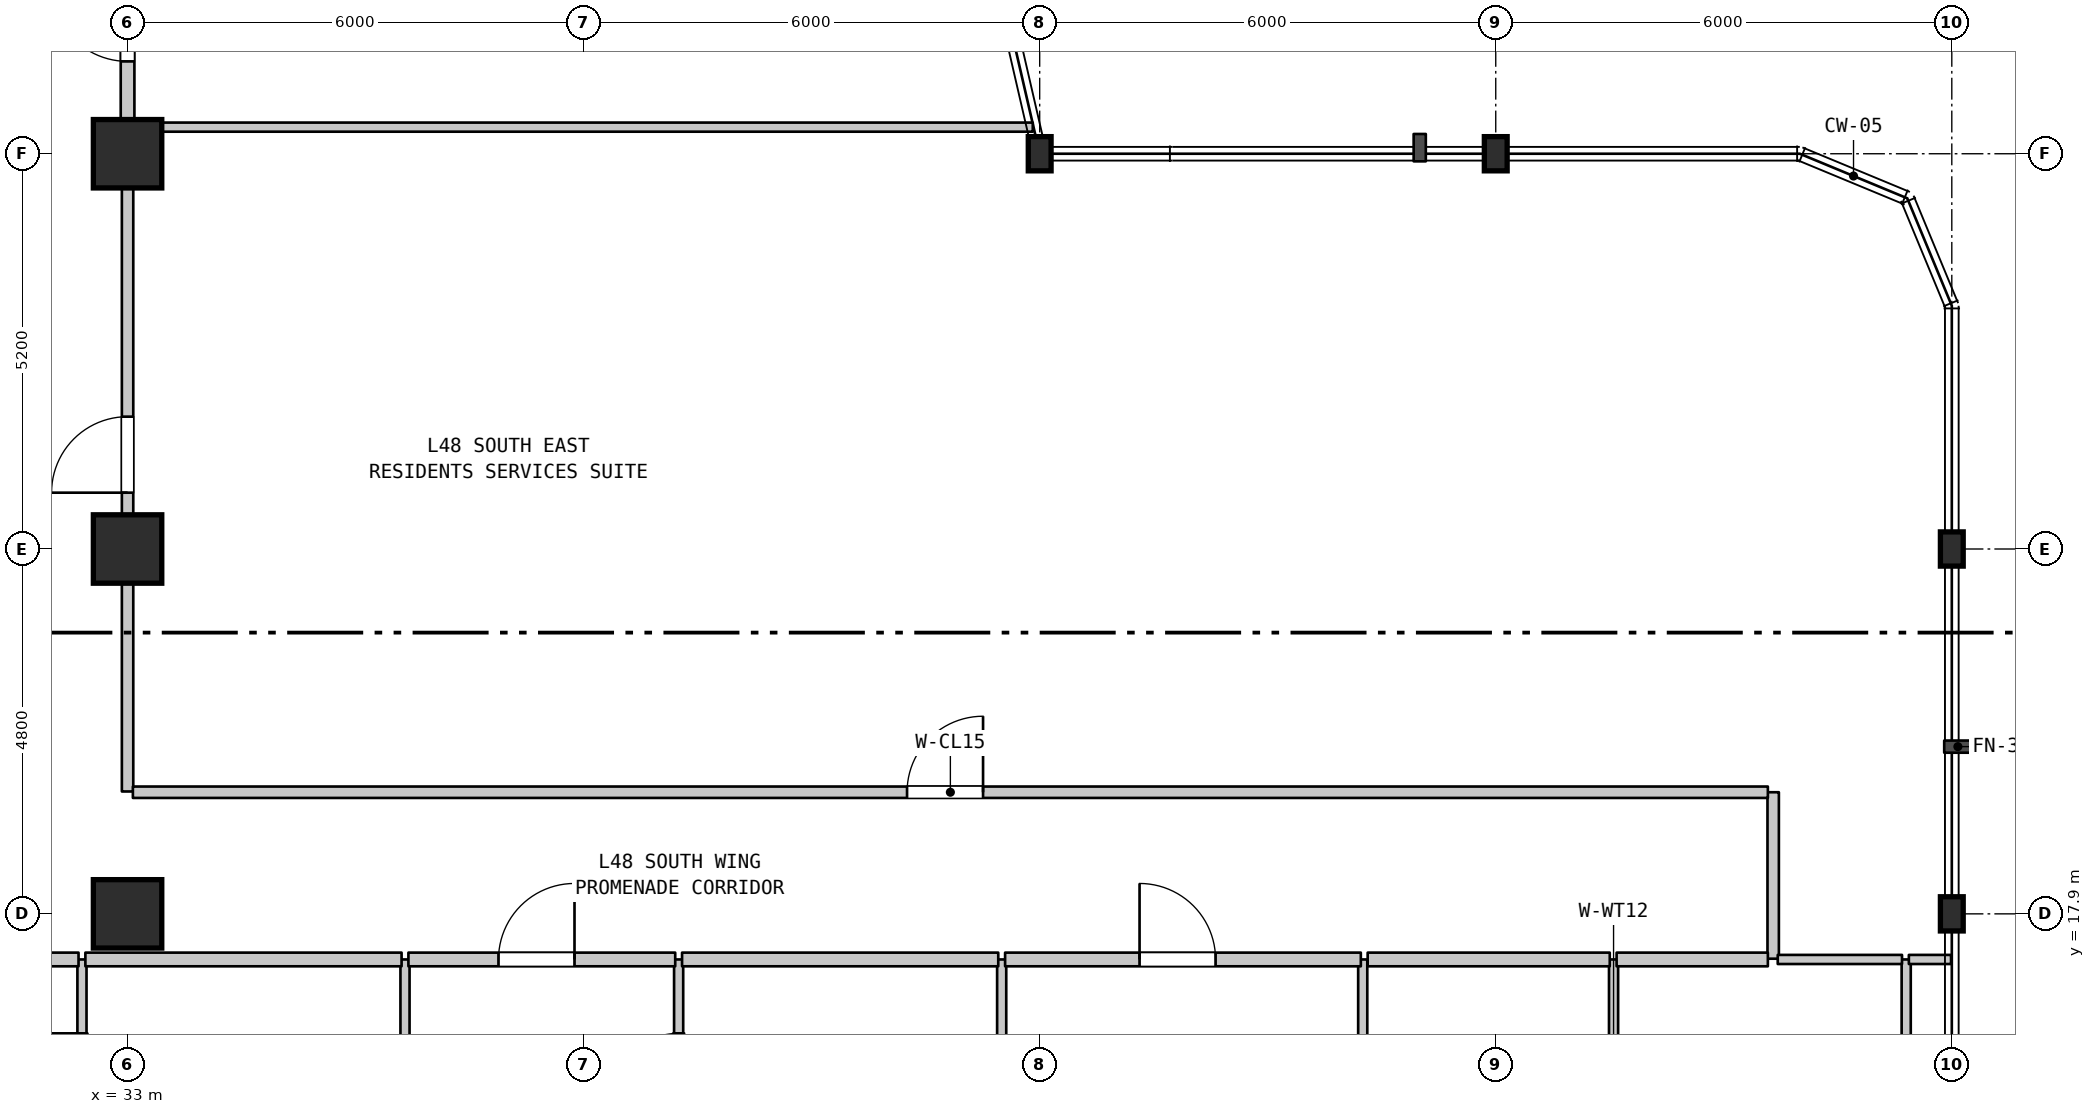
"""IFC4 building model, lengths in metres.
Left out: names, types, materials, properties, quantities, classifications, styles, units other than length and angle.
Written with IfcOpenShell. Run it as: python <this file> out.ifc"""

import sys

from ifc_helpers import new_model, si_unit, direction, frame, frame_2d, origin, origin_2d, place, context, subcontext, project, spatial, rectangle, i_section, extrude, element, fill, save


model = new_model("IFC4")
c1 = context("Model", 3, precision=1e-05, world=origin(), true_north=direction((0.0, 1.0)))
c2 = subcontext(c1, "Body", "Model", "MODEL_VIEW")
j1 = project(units=[si_unit("LENGTHUNIT", "METRE"), si_unit("PLANEANGLEUNIT", "RADIAN")], contexts=[c1])
p1 = place(None, origin())
s1 = spatial("IfcSite", under=j1, at=p1, CompositionType="ELEMENT")
p2 = place(p1, origin())
s2 = spatial("IfcBuilding", under=s1, at=p2, CompositionType="ELEMENT")
p3 = place(p2, frame((0.0, 0.0, 195.8)))
s3 = spatial("IfcBuildingStorey", under=s2, at=p3, CompositionType="ELEMENT", Elevation=195.8)
for number, where, z_axis, x_axis in (
    (1, (33.0, 17.9, 0.0), (0.0, 0.0, 1.0), (1.0, 0.0, 0.0)),
    (2, (33.0, 22.7, 0.0), (0.0, 0.0, 1.0), (1.0, 0.0, 0.0)),
    (3, (33.0, 27.9, 0.0), (0.0, 0.0, 1.0), (1.0, 0.0, 0.0)),
):
    element("IfcColumn", number, at=place(p3, frame(where, z_axis=z_axis, x_axis=x_axis)), inside=s3, PredefinedType="COLUMN", context=c2, shape_type="SweptSolid", body=[
        extrude(rectangle(XDim=0.9, YDim=0.9, at=origin_2d()), origin(), (0.0, 0.0, 1.0), 3.7),
    ])
for number, where, z_axis, x_axis in (
    (4, (45.0, 27.9, 0.0), (0.0, 0.0, 1.0), (1.0, 0.0, 0.0)),
    (5, (51.0, 27.9, 0.0), (0.0, 0.0, 1.0), (1.0, 0.0, 0.0)),
    (6, (57.0, 17.9, 0.0), (0.0, 0.0, 1.0), (1.0, 0.0, 0.0)),
    (7, (57.0, 22.7, 0.0), (0.0, 0.0, 1.0), (1.0, 0.0, 0.0)),
):
    element("IfcColumn", number, at=place(p3, frame(where, z_axis=z_axis, x_axis=x_axis)), inside=s3, PredefinedType="COLUMN", context=c2, shape_type="SweptSolid", body=[
        extrude(i_section(OverallWidth=0.3, OverallDepth=0.45, WebThickness=0.014, FlangeThickness=0.026, FilletRadius=0.027, at=origin_2d()), origin(), (0.0, 0.0, 1.0), 3.7),
    ])
p4 = place(p3, frame((32.4, 14.6, 0.0), z_axis=(0.0, 0.0, 1.0), x_axis=(0.0, 1.0, 0.0)))
e8 = element("IfcWall", 8, at=p4, inside=s3, PredefinedType="PARTITIONING", context=c2, shape_type="SweptSolid", body=[
    extrude(rectangle(XDim=2.7, YDim=0.12, at=frame_2d((1.35, 0.0))), origin(), (0.0, 0.0, 1.0), 3.39),
])
p5 = place(p4, frame((0.828, 0.0, 0.0)))
e9 = element("IfcOpeningElement", 9, at=p5, cuts=e8, PredefinedType="OPENING", context=c2, shape_type="SweptSolid", body=[
    extrude(rectangle(XDim=0.9, YDim=2.1, at=frame_2d((0.45, 1.05))), frame((0.0, 0.07, 0.0), z_axis=(0.0, -1.0, 0.0), x_axis=(1.0, 0.0, 0.0)), (0.0, 0.0, 1.0), 0.14),
])
p6 = place(p3, frame((33.0, 19.51, 0.0), z_axis=(0.0, 0.0, 1.0), x_axis=(0.0, 1.0, 0.0)))
e10 = element("IfcWall", 10, at=p6, inside=s3, PredefinedType="STANDARD", context=c2, shape_type="SweptSolid", body=[
    extrude(rectangle(XDim=8.72, YDim=0.15, at=frame_2d((4.36, 0.0))), origin(), (0.0, 0.0, 1.0), 2.99),
])
p7 = place(p6, frame((3.931, 0.0, 0.0)))
e11 = element("IfcOpeningElement", 11, at=p7, cuts=e10, PredefinedType="OPENING", context=c2, shape_type="SweptSolid", body=[
    extrude(rectangle(XDim=1.0, YDim=2.15, at=frame_2d((0.5, 1.075))), frame((0.0, 0.085, 0.0), z_axis=(0.0, -1.0, 0.0), x_axis=(1.0, 0.0, 0.0)), (0.0, 0.0, 1.0), 0.17),
])
p8 = place(p3, frame((33.0, 28.24, 0.0), z_axis=(0.0, 0.0, 1.0), x_axis=(0.0, 1.0, 0.0)))
e12 = element("IfcWall", 12, at=p8, inside=s3, PredefinedType="STANDARD", context=c2, shape_type="SweptSolid", body=[
    extrude(rectangle(XDim=2.75, YDim=0.18, at=frame_2d((1.375, 0.0))), origin(), (0.0, 0.0, 1.0), 2.89),
])
p9 = place(p8, frame((0.875, 0.0, 0.0)))
e13 = element("IfcOpeningElement", 13, at=p9, cuts=e12, PredefinedType="OPENING", context=c2, shape_type="SweptSolid", body=[
    extrude(rectangle(XDim=1.0, YDim=2.15, at=frame_2d((0.5, 1.075))), frame((0.0, 0.1, 0.0), z_axis=(0.0, -1.0, 0.0), x_axis=(1.0, 0.0, 0.0)), (0.0, 0.0, 1.0), 0.2),
])
p10 = place(p3, frame((36.65, 14.6, 0.0), z_axis=(0.0, 0.0, 1.0), x_axis=(0.0, 1.0, 0.0)))
e14 = element("IfcWall", 14, at=p10, inside=s3, PredefinedType="PARTITIONING", context=c2, shape_type="SweptSolid", body=[
    extrude(rectangle(XDim=2.7, YDim=0.12, at=frame_2d((1.35, 0.0))), origin(), (0.0, 0.0, 1.0), 3.39),
])
p11 = place(p3, frame((40.25, 14.6, 0.0), z_axis=(0.0, 0.0, 1.0), x_axis=(0.0, 1.0, 0.0)))
e15 = element("IfcWall", 15, at=p11, inside=s3, PredefinedType="PARTITIONING", context=c2, shape_type="SweptSolid", body=[
    extrude(rectangle(XDim=2.7, YDim=0.12, at=frame_2d((1.35, 0.0))), origin(), (0.0, 0.0, 1.0), 3.39),
])
p12 = place(p11, frame((0.828, 0.0, 0.0)))
e16 = element("IfcOpeningElement", 16, at=p12, cuts=e15, PredefinedType="OPENING", context=c2, shape_type="SweptSolid", body=[
    extrude(rectangle(XDim=0.9, YDim=2.1, at=frame_2d((0.45, 1.05))), frame((0.0, 0.07, 0.0), z_axis=(0.0, -1.0, 0.0), x_axis=(1.0, 0.0, 0.0)), (0.0, 0.0, 1.0), 0.14),
])
p13 = place(p3, frame((44.5, 14.85, 0.0), z_axis=(0.0, 0.0, 1.0), x_axis=(0.0, 1.0, 0.0)))
e17 = element("IfcWall", 17, at=p13, inside=s3, PredefinedType="PARTITIONING", context=c2, shape_type="SweptSolid", body=[
    extrude(rectangle(XDim=2.45, YDim=0.12, at=frame_2d((1.225, 0.0))), origin(), (0.0, 0.0, 1.0), 3.39),
])
for number, where, z_axis, x_axis in (
    (18, (49.25, 11.15, 0.0), (0.0, 0.0, 1.0), (0.0, 1.0, 0.0)),
    (19, (52.55, 11.15, 0.0), (0.0, 0.0, 1.0), (0.0, 1.0, 0.0)),
):
    element("IfcWall", number, at=place(p3, frame(where, z_axis=z_axis, x_axis=x_axis)), inside=s3, PredefinedType="PARTITIONING", context=c2, shape_type="SweptSolid", body=[
        extrude(rectangle(XDim=6.15, YDim=0.12, at=frame_2d((3.075, 0.0))), origin(), (0.0, 0.0, 1.0), 3.39),
    ])
p14 = place(p3, frame((54.65, 17.31, 0.0), z_axis=(0.0, 0.0, 1.0), x_axis=(0.0, 1.0, 0.0)))
e20 = element("IfcWall", 20, at=p14, inside=s3, PredefinedType="STANDARD", context=c2, shape_type="SweptSolid", body=[
    extrude(rectangle(XDim=2.19, YDim=0.15, at=frame_2d((1.095, 0.0))), origin(), (0.0, 0.0, 1.0), 3.39),
])
p15 = place(p3, frame((56.4, 11.15, 0.0), z_axis=(0.0, 0.0, 1.0), x_axis=(0.0, 1.0, 0.0)))
e21 = element("IfcWall", 21, at=p15, inside=s3, PredefinedType="PARTITIONING", context=c2, shape_type="SweptSolid", body=[
    extrude(rectangle(XDim=6.15, YDim=0.12, at=frame_2d((3.075, 0.0))), origin(), (0.0, 0.0, 1.0), 3.39),
])
p16 = place(p3, frame((28.845, 17.3, 0.0), z_axis=(0.0, 0.0, 1.0), x_axis=(1.0, 0.0, 0.0)))
e22 = element("IfcWall", 22, at=p16, inside=s3, PredefinedType="STANDARD", context=c2, shape_type="SweptSolid", body=[
    extrude(rectangle(XDim=3.51, YDim=0.18, at=frame_2d((1.755, 0.0))), origin(), (0.0, 0.0, 1.0), 3.39),
])
p17 = place(p16, frame((1.255, 0.0, 0.0)))
e23 = element("IfcOpeningElement", 23, at=p17, cuts=e22, PredefinedType="OPENING", context=c2, shape_type="SweptSolid", body=[
    extrude(rectangle(XDim=1.0, YDim=2.15, at=frame_2d((0.5, 1.075))), frame((0.0, 0.1, 0.0), z_axis=(0.0, -1.0, 0.0), x_axis=(1.0, 0.0, 0.0)), (0.0, 0.0, 1.0), 0.2),
])
p18 = place(p3, frame((32.445, 17.3, 0.0), z_axis=(0.0, 0.0, 1.0), x_axis=(1.0, 0.0, 0.0)))
e24 = element("IfcWall", 24, at=p18, inside=s3, PredefinedType="STANDARD", context=c2, shape_type="SweptSolid", body=[
    extrude(rectangle(XDim=4.16, YDim=0.18, at=frame_2d((2.08, 0.0))), origin(), (0.0, 0.0, 1.0), 3.39),
])
p19 = place(p3, frame((36.695, 17.3, 0.0), z_axis=(0.0, 0.0, 1.0), x_axis=(1.0, 0.0, 0.0)))
e25 = element("IfcWall", 25, at=p19, inside=s3, PredefinedType="STANDARD", context=c2, shape_type="SweptSolid", body=[
    extrude(rectangle(XDim=3.51, YDim=0.18, at=frame_2d((1.755, 0.0))), origin(), (0.0, 0.0, 1.0), 3.39),
])
p20 = place(p19, frame((1.185, 0.0, 0.0)))
e26 = element("IfcOpeningElement", 26, at=p20, cuts=e25, PredefinedType="OPENING", context=c2, shape_type="SweptSolid", body=[
    extrude(rectangle(XDim=1.0, YDim=2.15, at=frame_2d((0.5, 1.075))), frame((0.0, 0.1, 0.0), z_axis=(0.0, -1.0, 0.0), x_axis=(1.0, 0.0, 0.0)), (0.0, 0.0, 1.0), 0.2),
])
p21 = place(p3, frame((40.295, 17.3, 0.0), z_axis=(0.0, 0.0, 1.0), x_axis=(1.0, 0.0, 0.0)))
e27 = element("IfcWall", 27, at=p21, inside=s3, PredefinedType="STANDARD", context=c2, shape_type="SweptSolid", body=[
    extrude(rectangle(XDim=4.16, YDim=0.18, at=frame_2d((2.08, 0.0))), origin(), (0.0, 0.0, 1.0), 3.39),
])
p22 = place(p3, frame((44.545, 17.3, 0.0), z_axis=(0.0, 0.0, 1.0), x_axis=(1.0, 0.0, 0.0)))
e28 = element("IfcWall", 28, at=p22, inside=s3, PredefinedType="STANDARD", context=c2, shape_type="SweptSolid", body=[
    extrude(rectangle(XDim=4.68, YDim=0.18, at=frame_2d((2.34, 0.0))), origin(), (0.0, 0.0, 1.0), 3.39),
])
p23 = place(p22, frame((1.769, 0.0, 0.0)))
e29 = element("IfcOpeningElement", 29, at=p23, cuts=e28, PredefinedType="OPENING", context=c2, shape_type="SweptSolid", body=[
    extrude(rectangle(XDim=1.0, YDim=2.15, at=frame_2d((0.5, 1.075))), frame((0.0, 0.1, 0.0), z_axis=(0.0, -1.0, 0.0), x_axis=(1.0, 0.0, 0.0)), (0.0, 0.0, 1.0), 0.2),
])
p24 = place(p3, frame((49.315, 17.3, 0.0), z_axis=(0.0, 0.0, 1.0), x_axis=(1.0, 0.0, 0.0)))
e30 = element("IfcWall", 30, at=p24, inside=s3, PredefinedType="STANDARD", context=c2, shape_type="SweptSolid", body=[
    extrude(rectangle(XDim=3.185, YDim=0.18, at=frame_2d((1.593, 0.0))), origin(), (0.0, 0.0, 1.0), 3.39),
])
p25 = place(p3, frame((52.59, 17.3, 0.0), z_axis=(0.0, 0.0, 1.0), x_axis=(1.0, 0.0, 0.0)))
e31 = element("IfcWall", 31, at=p25, inside=s3, PredefinedType="STANDARD", context=c2, shape_type="SweptSolid", body=[
    extrude(rectangle(XDim=1.99, YDim=0.18, at=frame_2d((0.995, 0.0))), origin(), (0.0, 0.0, 1.0), 3.39),
])
p26 = place(p3, frame((54.71, 17.3, 0.0), z_axis=(0.0, 0.0, 1.0), x_axis=(1.0, 0.0, 0.0)))
e32 = element("IfcWall", 32, at=p26, inside=s3, PredefinedType="PARTITIONING", context=c2, shape_type="SweptSolid", body=[
    extrude(rectangle(XDim=1.635, YDim=0.12, at=frame_2d((0.817, 0.0))), origin(), (0.0, 0.0, 1.0), 3.39),
])
p27 = place(p3, frame((56.435, 17.3, 0.0), z_axis=(0.0, 0.0, 1.0), x_axis=(1.0, 0.0, 0.0)))
e33 = element("IfcWall", 33, at=p27, inside=s3, PredefinedType="PARTITIONING", context=c2, shape_type="SweptSolid", body=[
    extrude(rectangle(XDim=0.555, YDim=0.12, at=frame_2d((0.277, 0.0))), origin(), (0.0, 0.0, 1.0), 3.39),
])
p28 = place(p3, frame((33.07, 19.5, 0.0), z_axis=(0.0, 0.0, 1.0), x_axis=(1.0, 0.0, 0.0)))
e34 = element("IfcWall", 34, at=p28, inside=s3, PredefinedType="STANDARD", context=c2, shape_type="SweptSolid", body=[
    extrude(rectangle(XDim=21.51, YDim=0.15, at=frame_2d((10.755, 0.0))), origin(), (0.0, 0.0, 1.0), 3.39),
])
p29 = place(p28, frame((10.185, 0.0, 0.0)))
e35 = element("IfcOpeningElement", 35, at=p29, cuts=e34, PredefinedType="OPENING", context=c2, shape_type="SweptSolid", body=[
    extrude(rectangle(XDim=1.0, YDim=2.15, at=frame_2d((0.5, 1.075))), frame((0.0, 0.085, 0.0), z_axis=(0.0, -1.0, 0.0), x_axis=(1.0, 0.0, 0.0)), (0.0, 0.0, 1.0), 0.17),
])
p30 = place(p3, frame((33.085, 28.25, 0.0), z_axis=(0.0, 0.0, 1.0), x_axis=(1.0, 0.0, 0.0)))
e36 = element("IfcWall", 36, at=p30, inside=s3, PredefinedType="PARTITIONING", context=c2, shape_type="SweptSolid", body=[
    extrude(rectangle(XDim=11.824, YDim=0.12, at=frame_2d((5.912, 0.0))), origin(), (0.0, 0.0, 1.0), 3.39),
])
p31 = place(p5, origin())
e37 = element("IfcDoor", 37, at=p31, inside=s3, OperationType="SINGLE_SWING_RIGHT", PredefinedType="DOOR", context=c2, shape_type="SweptSolid", body=[
    extrude(rectangle(XDim=0.9, YDim=2.1, at=frame_2d((0.45, 1.05))), frame((0.0, 0.025, 0.0), z_axis=(0.0, -1.0, 0.0), x_axis=(1.0, 0.0, 0.0)), (0.0, 0.0, 1.0), 0.05),
])
fill(e9, e37)
p32 = place(p7, origin())
e38 = element("IfcDoor", 38, at=p32, inside=s3, OperationType="SINGLE_SWING_LEFT", PredefinedType="DOOR", context=c2, shape_type="SweptSolid", body=[
    extrude(rectangle(XDim=1.0, YDim=2.15, at=frame_2d((0.5, 1.075))), frame((0.0, 0.025, 0.0), z_axis=(0.0, -1.0, 0.0), x_axis=(1.0, 0.0, 0.0)), (0.0, 0.0, 1.0), 0.05),
])
fill(e11, e38)
p33 = place(p9, origin())
e39 = element("IfcDoor", 39, at=p33, inside=s3, OperationType="SINGLE_SWING_RIGHT", PredefinedType="DOOR", context=c2, shape_type="SweptSolid", body=[
    extrude(rectangle(XDim=1.0, YDim=2.15, at=frame_2d((0.5, 1.075))), frame((0.0, 0.025, 0.0), z_axis=(0.0, -1.0, 0.0), x_axis=(1.0, 0.0, 0.0)), (0.0, 0.0, 1.0), 0.05),
])
fill(e13, e39)
p34 = place(p12, origin())
e40 = element("IfcDoor", 40, at=p34, inside=s3, OperationType="SINGLE_SWING_LEFT", PredefinedType="DOOR", context=c2, shape_type="SweptSolid", body=[
    extrude(rectangle(XDim=0.9, YDim=2.1, at=frame_2d((0.45, 1.05))), frame((0.0, 0.025, 0.0), z_axis=(0.0, -1.0, 0.0), x_axis=(1.0, 0.0, 0.0)), (0.0, 0.0, 1.0), 0.05),
])
fill(e16, e40)
p35 = place(p20, origin())
e41 = element("IfcDoor", 41, at=p35, inside=s3, OperationType="SINGLE_SWING_RIGHT", PredefinedType="DOOR", context=c2, shape_type="SweptSolid", body=[
    extrude(rectangle(XDim=1.0, YDim=2.15, at=frame_2d((0.5, 1.075))), frame((0.0, 0.025, 0.0), z_axis=(0.0, -1.0, 0.0), x_axis=(1.0, 0.0, 0.0)), (0.0, 0.0, 1.0), 0.05),
])
fill(e26, e41)
p36 = place(p23, origin())
e42 = element("IfcDoor", 42, at=p36, inside=s3, OperationType="SINGLE_SWING_LEFT", PredefinedType="DOOR", context=c2, shape_type="SweptSolid", body=[
    extrude(rectangle(XDim=1.0, YDim=2.15, at=frame_2d((0.5, 1.075))), frame((0.0, 0.025, 0.0), z_axis=(0.0, -1.0, 0.0), x_axis=(1.0, 0.0, 0.0)), (0.0, 0.0, 1.0), 0.05),
])
fill(e29, e42)
p37 = place(p29, origin())
e43 = element("IfcDoor", 43, at=p37, inside=s3, OperationType="SINGLE_SWING_RIGHT", PredefinedType="DOOR", context=c2, shape_type="SweptSolid", body=[
    extrude(rectangle(XDim=1.0, YDim=2.15, at=frame_2d((0.5, 1.075))), frame((0.0, 0.025, 0.0), z_axis=(0.0, -1.0, 0.0), x_axis=(1.0, 0.0, 0.0)), (0.0, 0.0, 1.0), 0.05),
])
fill(e35, e43)
save(model, sys.argv[1])
